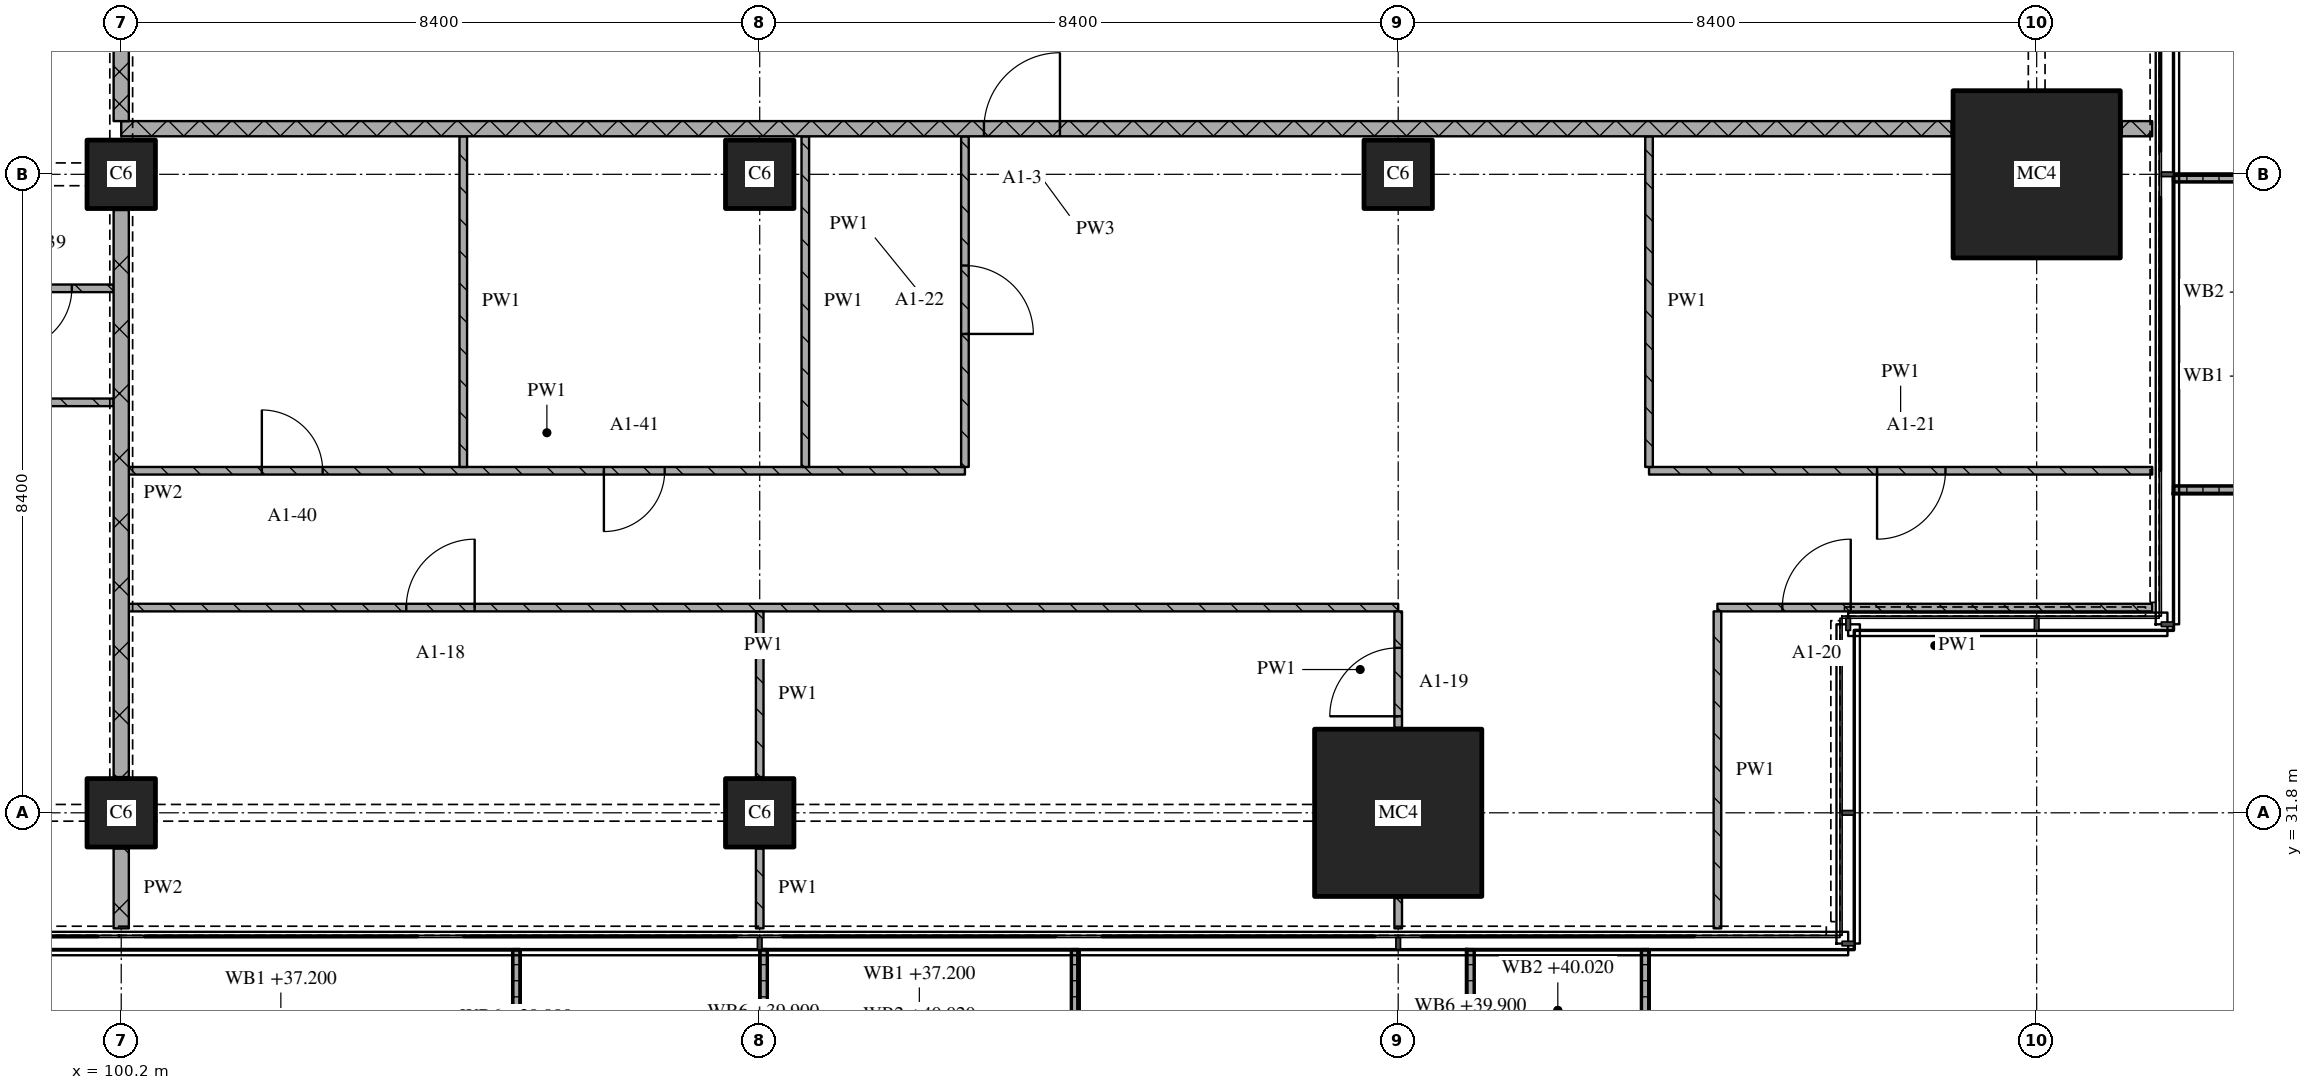
"""IFC4 building model, lengths in metres.
Left out: names, types, materials, properties, quantities, classifications, styles, units other than length and angle.
Written with IfcOpenShell. Run it as: python <this file> out.ifc"""

import sys

from ifc_helpers import new_model, si_unit, direction, frame, frame_2d, origin, origin_2d, place, context, subcontext, project, spatial, polyline, rectangle, outline, extrude, element, fill, save


model = new_model("IFC4")
c1 = context("Model", 3, precision=1e-05, world=origin(), true_north=direction((0.0, 1.0)))
c2 = subcontext(c1, "Body", "Model", "MODEL_VIEW")
j1 = project(units=[si_unit("LENGTHUNIT", "METRE"), si_unit("PLANEANGLEUNIT", "RADIAN")], contexts=[c1])
p1 = place(None, origin())
s1 = spatial("IfcSite", under=j1, at=p1, CompositionType="ELEMENT")
p2 = place(p1, origin())
s2 = spatial("IfcBuilding", under=s1, at=p2, CompositionType="ELEMENT")
p3 = place(p2, frame((0.0, 0.0, 37.2)))
s3 = spatial("IfcBuildingStorey", under=s2, at=p3, CompositionType="ELEMENT", Elevation=37.2)
for number, where, z_axis, x_axis in (
    (1, (100.2, 31.8, 0.0), (0.0, 0.0, 1.0), (1.0, 0.0, 0.0)),
    (2, (100.2, 40.2, 0.0), (0.0, 0.0, 1.0), (1.0, 0.0, 0.0)),
    (3, (108.6, 31.8, 0.0), (0.0, 0.0, 1.0), (1.0, 0.0, 0.0)),
    (4, (108.6, 40.2, 0.0), (0.0, 0.0, 1.0), (1.0, 0.0, 0.0)),
):
    element("IfcColumn", number, at=place(p3, frame(where, z_axis=z_axis, x_axis=x_axis)), inside=s3, PredefinedType="COLUMN", context=c2, shape_type="SweptSolid", body=[
        extrude(rectangle(XDim=0.9, YDim=0.9, at=origin_2d()), origin(), (0.0, 0.0, 1.0), 3.6),
    ])
p4 = place(p3, frame((117.0, 31.8, 0.0), z_axis=(0.0, 0.0, 1.0), x_axis=(1.0, 0.0, 0.0)))
e5 = element("IfcColumn", 5, at=p4, inside=s3, PredefinedType="COLUMN", context=c2, shape_type="SweptSolid", body=[
    extrude(rectangle(XDim=2.2, YDim=2.2, at=origin_2d()), origin(), (0.0, 0.0, 1.0), 3.6),
])
p5 = place(p3, frame((117.0, 40.2, 0.0), z_axis=(0.0, 0.0, 1.0), x_axis=(1.0, 0.0, 0.0)))
e6 = element("IfcColumn", 6, at=p5, inside=s3, PredefinedType="COLUMN", context=c2, shape_type="SweptSolid", body=[
    extrude(rectangle(XDim=0.9, YDim=0.9, at=origin_2d()), origin(), (0.0, 0.0, 1.0), 3.6),
])
p6 = place(p3, frame((125.4, 40.2, 0.0), z_axis=(0.0, 0.0, 1.0), x_axis=(1.0, 0.0, 0.0)))
e7 = element("IfcColumn", 7, at=p6, inside=s3, PredefinedType="COLUMN", context=c2, shape_type="SweptSolid", body=[
    extrude(rectangle(XDim=2.2, YDim=2.2, at=origin_2d()), origin(), (0.0, 0.0, 1.0), 3.6),
])
p7 = place(p3, origin())
e8 = element("IfcWall", 8, at=p7, inside=s3, PredefinedType="SOLIDWALL", context=c2, shape_type="SweptSolid", body=[
    extrude(outline(polyline([(99.15, 30.0), (99.25, 30.0), (99.25, 28.233), (105.35, 28.233), (105.35, 30.0), (105.45, 30.0), (105.45, 28.133), (99.15, 28.133), (99.15, 30.0)])), origin(), (0.0, 0.0, 1.0), 1.0),
])
p8 = place(p3, origin())
e9 = element("IfcWall", 9, at=p8, inside=s3, PredefinedType="SOLIDWALL", context=c2, shape_type="SweptSolid", body=[
    extrude(outline(polyline([(108.6, 30.0), (108.7, 30.0), (108.7, 28.367), (112.7, 28.367), (112.7, 30.0), (112.8, 30.0), (112.8, 28.267), (108.6, 28.267), (108.6, 30.0)])), origin(), (0.0, 0.0, 1.0), 1.0),
])
p9 = place(p3, origin())
e10 = element("IfcWall", 10, at=p9, inside=s3, PredefinedType="SOLIDWALL", context=c2, shape_type="SweptSolid", body=[
    extrude(outline(polyline([(117.9, 30.0), (118.0, 30.0), (118.0, 28.5), (120.2, 28.5), (120.2, 30.0), (120.3, 30.0), (120.3, 28.4), (117.9, 28.4), (117.9, 30.0)])), origin(), (0.0, 0.0, 1.0), 1.0),
])
p10 = place(p3, origin())
e11 = element("IfcWall", 11, at=p10, inside=s3, PredefinedType="SOLIDWALL", context=c2, shape_type="SweptSolid", body=[
    extrude(outline(polyline([(127.2, 36.0), (127.2, 36.1), (128.833, 36.1), (128.833, 40.1), (127.2, 40.1), (127.2, 40.2), (128.933, 40.2), (128.933, 36.0), (127.2, 36.0)])), origin(), (0.0, 0.0, 1.0), 1.0),
])
p11 = place(p3, frame((117.0, 34.5, 0.0), z_axis=(0.0, 0.0, 1.0), x_axis=(-1.0, 0.0, 0.0)))
e12 = element("IfcWall", 12, at=p11, inside=s3, PredefinedType="PARTITIONING", context=c2, shape_type="SweptSolid", body=[
    extrude(rectangle(XDim=16.7, YDim=0.1, at=frame_2d((8.35, 0.0))), origin(), (0.0, 0.0, 1.0), 3.32),
])
p12 = place(p11, frame((12.15, 0.0, 0.0)))
e13 = element("IfcOpeningElement", 13, at=p12, cuts=e12, PredefinedType="OPENING", context=c2, shape_type="SweptSolid", body=[
    extrude(rectangle(XDim=0.9, YDim=2.1, at=frame_2d((0.45, 1.05))), frame((0.0, 0.06, 0.0), z_axis=(0.0, -1.0, 0.0), x_axis=(1.0, 0.0, 0.0)), (0.0, 0.0, 1.0), 0.12),
])
p13 = place(p3, frame((126.92, 34.5, 0.0), z_axis=(0.0, 0.0, 1.0), x_axis=(-1.0, 0.0, 0.0)))
e14 = element("IfcWall", 14, at=p13, inside=s3, PredefinedType="PARTITIONING", context=c2, shape_type="SweptSolid", body=[
    extrude(rectangle(XDim=5.72, YDim=0.1, at=frame_2d((2.86, 0.0))), origin(), (0.0, 0.0, 1.0), 3.32),
])
p14 = place(p13, frame((3.966, 0.0, 0.0)))
e15 = element("IfcOpeningElement", 15, at=p14, cuts=e14, PredefinedType="OPENING", context=c2, shape_type="SweptSolid", body=[
    extrude(rectangle(XDim=0.9, YDim=2.1, at=frame_2d((0.45, 1.05))), frame((0.0, 0.06, 0.0), z_axis=(0.0, -1.0, 0.0), x_axis=(1.0, 0.0, 0.0)), (0.0, 0.0, 1.0), 0.12),
])
p15 = place(p3, frame((100.3, 36.3, 0.0), z_axis=(0.0, 0.0, 1.0), x_axis=(1.0, 0.0, 0.0)))
e16 = element("IfcWall", 16, at=p15, inside=s3, PredefinedType="PARTITIONING", context=c2, shape_type="SweptSolid", body=[
    extrude(rectangle(XDim=11.0, YDim=0.1, at=frame_2d((5.5, 0.0))), origin(), (0.0, 0.0, 1.0), 3.32),
])
p16 = place(p15, frame((1.75, 0.0, 0.0)))
e17 = element("IfcOpeningElement", 17, at=p16, cuts=e16, PredefinedType="OPENING", context=c2, shape_type="SweptSolid", body=[
    extrude(rectangle(XDim=0.8, YDim=2.1, at=frame_2d((0.4, 1.05))), frame((0.0, 0.06, 0.0), z_axis=(0.0, -1.0, 0.0), x_axis=(1.0, 0.0, 0.0)), (0.0, 0.0, 1.0), 0.12),
])
p17 = place(p15, frame((6.25, 0.0, 0.0)))
e18 = element("IfcOpeningElement", 18, at=p17, cuts=e16, PredefinedType="OPENING", context=c2, shape_type="SweptSolid", body=[
    extrude(rectangle(XDim=0.8, YDim=2.1, at=frame_2d((0.4, 1.05))), frame((0.0, 0.06, 0.0), z_axis=(0.0, -1.0, 0.0), x_axis=(1.0, 0.0, 0.0)), (0.0, 0.0, 1.0), 0.12),
])
p18 = place(p3, frame((120.3, 36.3, 0.0), z_axis=(0.0, 0.0, 1.0), x_axis=(1.0, 0.0, 0.0)))
e19 = element("IfcWall", 19, at=p18, inside=s3, PredefinedType="PARTITIONING", context=c2, shape_type="SweptSolid", body=[
    extrude(rectangle(XDim=6.62, YDim=0.1, at=frame_2d((3.31, 0.0))), origin(), (0.0, 0.0, 1.0), 3.32),
])
p19 = place(p18, frame((3.0, 0.0, 0.0)))
e20 = element("IfcOpeningElement", 20, at=p19, cuts=e19, PredefinedType="OPENING", context=c2, shape_type="SweptSolid", body=[
    extrude(rectangle(XDim=0.9, YDim=2.1, at=frame_2d((0.45, 1.05))), frame((0.0, 0.06, 0.0), z_axis=(0.0, -1.0, 0.0), x_axis=(1.0, 0.0, 0.0)), (0.0, 0.0, 1.0), 0.12),
])
p20 = place(p3, frame((100.1, 37.2, 0.0), z_axis=(0.0, 0.0, 1.0), x_axis=(-1.0, 0.0, 0.0)))
e21 = element("IfcWall", 21, at=p20, inside=s3, PredefinedType="PARTITIONING", context=c2, shape_type="SweptSolid", body=[
    extrude(rectangle(XDim=8.3, YDim=0.1, at=frame_2d((4.15, 0.0))), origin(), (0.0, 0.0, 1.0), 3.32),
])
p21 = place(p20, frame((3.65, 0.0, 0.0)))
e22 = element("IfcOpeningElement", 22, at=p21, cuts=e21, PredefinedType="OPENING", context=c2, shape_type="SweptSolid", body=[
    extrude(rectangle(XDim=0.9, YDim=2.1, at=frame_2d((0.45, 1.05))), frame((0.0, 0.06, 0.0), z_axis=(0.0, -1.0, 0.0), x_axis=(1.0, 0.0, 0.0)), (0.0, 0.0, 1.0), 0.12),
])
p22 = place(p3, frame((93.9, 38.7, 0.0), z_axis=(0.0, 0.0, 1.0), x_axis=(1.0, 0.0, 0.0)))
e23 = element("IfcWall", 23, at=p22, inside=s3, PredefinedType="PARTITIONING", context=c2, shape_type="SweptSolid", body=[
    extrude(rectangle(XDim=6.2, YDim=0.1, at=frame_2d((3.1, 0.0))), origin(), (0.0, 0.0, 1.0), 3.32),
])
p23 = place(p22, frame((4.85, 0.0, 0.0)))
e24 = element("IfcOpeningElement", 24, at=p23, cuts=e23, PredefinedType="OPENING", context=c2, shape_type="SweptSolid", body=[
    extrude(rectangle(XDim=0.8, YDim=2.1, at=frame_2d((0.4, 1.05))), frame((0.0, 0.06, 0.0), z_axis=(0.0, -1.0, 0.0), x_axis=(1.0, 0.0, 0.0)), (0.0, 0.0, 1.0), 0.12),
])
p24 = place(p3, frame((124.28, 40.8, 0.0), z_axis=(0.0, 0.0, 1.0), x_axis=(-1.0, 0.0, 0.0)))
e25 = element("IfcWall", 25, at=p24, inside=s3, PredefinedType="PARTITIONING", context=c2, shape_type="SweptSolid", body=[
    extrude(rectangle(XDim=24.08, YDim=0.2, at=frame_2d((12.04, 0.0))), origin(), (0.0, 0.0, 1.0), 3.32),
])
p25 = place(p24, frame((11.73, 0.0, 0.0)))
e26 = element("IfcOpeningElement", 26, at=p25, cuts=e25, PredefinedType="OPENING", context=c2, shape_type="SweptSolid", body=[
    extrude(rectangle(XDim=1.0, YDim=2.1, at=frame_2d((0.5, 1.05))), frame((0.0, 0.11, 0.0), z_axis=(0.0, -1.0, 0.0), x_axis=(1.0, 0.0, 0.0)), (0.0, 0.0, 1.0), 0.22),
])
p26 = place(p3, frame((126.52, 40.8, 0.0), z_axis=(0.0, 0.0, 1.0), x_axis=(1.0, 0.0, 0.0)))
e27 = element("IfcWall", 27, at=p26, inside=s3, PredefinedType="PARTITIONING", context=c2, shape_type="SweptSolid", body=[
    extrude(rectangle(XDim=0.4, YDim=0.2, at=frame_2d((0.2, 0.0))), origin(), (0.0, 0.0, 1.0), 3.32),
])
p27 = place(p3, frame((100.2, 43.1, 0.0), z_axis=(0.0, 0.0, 1.0), x_axis=(0.0, -1.0, 0.0)))
e28 = element("IfcWall", 28, at=p27, inside=s3, PredefinedType="PARTITIONING", context=c2, shape_type="SweptSolid", body=[
    extrude(rectangle(XDim=2.2, YDim=0.2, at=frame_2d((1.1, 0.0))), origin(), (0.0, 0.0, 1.0), 2.43),
])
p28 = place(p3, frame((100.2, 31.33, 0.0), z_axis=(0.0, 0.0, 1.0), x_axis=(0.0, -1.0, 0.0)))
e29 = element("IfcWall", 29, at=p28, inside=s3, PredefinedType="PARTITIONING", context=c2, shape_type="SweptSolid", body=[
    extrude(rectangle(XDim=1.05, YDim=0.2, at=frame_2d((0.525, 0.0))), origin(), (0.0, 0.0, 1.0), 3.32),
])
p29 = place(p3, frame((100.2, 39.73, 0.0), z_axis=(0.0, 0.0, 1.0), x_axis=(0.0, -1.0, 0.0)))
e30 = element("IfcWall", 30, at=p29, inside=s3, PredefinedType="PARTITIONING", context=c2, shape_type="SweptSolid", body=[
    extrude(rectangle(XDim=7.46, YDim=0.2, at=frame_2d((3.73, 0.0))), origin(), (0.0, 0.0, 1.0), 2.83),
])
p30 = place(p3, frame((104.7, 40.7, 0.0), z_axis=(0.0, 0.0, 1.0), x_axis=(0.0, -1.0, 0.0)))
e31 = element("IfcWall", 31, at=p30, inside=s3, PredefinedType="PARTITIONING", context=c2, shape_type="SweptSolid", body=[
    extrude(rectangle(XDim=4.35, YDim=0.1, at=frame_2d((2.175, 0.0))), origin(), (0.0, 0.0, 1.0), 3.32),
])
p31 = place(p3, frame((108.6, 31.33, 0.0), z_axis=(0.0, 0.0, 1.0), x_axis=(0.0, -1.0, 0.0)))
e32 = element("IfcWall", 32, at=p31, inside=s3, PredefinedType="PARTITIONING", context=c2, shape_type="SweptSolid", body=[
    extrude(rectangle(XDim=1.05, YDim=0.1, at=frame_2d((0.525, 0.0))), origin(), (0.0, 0.0, 1.0), 3.32),
])
p32 = place(p3, frame((108.6, 34.45, 0.0), z_axis=(0.0, 0.0, 1.0), x_axis=(0.0, -1.0, 0.0)))
e33 = element("IfcWall", 33, at=p32, inside=s3, PredefinedType="PARTITIONING", context=c2, shape_type="SweptSolid", body=[
    extrude(rectangle(XDim=2.18, YDim=0.1, at=frame_2d((1.09, 0.0))), origin(), (0.0, 0.0, 1.0), 3.32),
])
p33 = place(p3, frame((109.2, 40.7, 0.0), z_axis=(0.0, 0.0, 1.0), x_axis=(0.0, -1.0, 0.0)))
e34 = element("IfcWall", 34, at=p33, inside=s3, PredefinedType="PARTITIONING", context=c2, shape_type="SweptSolid", body=[
    extrude(rectangle(XDim=4.35, YDim=0.1, at=frame_2d((2.175, 0.0))), origin(), (0.0, 0.0, 1.0), 3.32),
])
p34 = place(p3, frame((111.3, 36.35, 0.0), z_axis=(0.0, 0.0, 1.0), x_axis=(0.0, 1.0, 0.0)))
e35 = element("IfcWall", 35, at=p34, inside=s3, PredefinedType="PARTITIONING", context=c2, shape_type="SweptSolid", body=[
    extrude(rectangle(XDim=4.35, YDim=0.1, at=frame_2d((2.175, 0.0))), origin(), (0.0, 0.0, 1.0), 3.32),
])
p35 = place(p34, frame((1.75, 0.0, 0.0)))
e36 = element("IfcOpeningElement", 36, at=p35, cuts=e35, PredefinedType="OPENING", context=c2, shape_type="SweptSolid", body=[
    extrude(rectangle(XDim=0.9, YDim=2.1, at=frame_2d((0.45, 1.05))), frame((0.0, 0.06, 0.0), z_axis=(0.0, -1.0, 0.0), x_axis=(1.0, 0.0, 0.0)), (0.0, 0.0, 1.0), 0.12),
])
p36 = place(p3, frame((117.0, 30.68, 0.0), z_axis=(0.0, 0.0, 1.0), x_axis=(0.0, -1.0, 0.0)))
e37 = element("IfcWall", 37, at=p36, inside=s3, PredefinedType="PARTITIONING", context=c2, shape_type="SweptSolid", body=[
    extrude(rectangle(XDim=0.4, YDim=0.1, at=frame_2d((0.2, 0.0))), origin(), (0.0, 0.0, 1.0), 3.32),
])
p37 = place(p3, frame((117.0, 32.92, 0.0), z_axis=(0.0, 0.0, 1.0), x_axis=(0.0, 1.0, 0.0)))
e38 = element("IfcWall", 38, at=p37, inside=s3, PredefinedType="PARTITIONING", context=c2, shape_type="SweptSolid", body=[
    extrude(rectangle(XDim=1.53, YDim=0.1, at=frame_2d((0.765, 0.0))), origin(), (0.0, 0.0, 1.0), 3.32),
])
p38 = place(p37, frame((0.15, 0.0, 0.0)))
e39 = element("IfcOpeningElement", 39, at=p38, cuts=e38, PredefinedType="OPENING", context=c2, shape_type="SweptSolid", body=[
    extrude(rectangle(XDim=0.9, YDim=2.1, at=frame_2d((0.45, 1.05))), frame((0.0, 0.06, 0.0), z_axis=(0.0, -1.0, 0.0), x_axis=(1.0, 0.0, 0.0)), (0.0, 0.0, 1.0), 0.12),
])
p39 = place(p3, frame((120.3, 40.7, 0.0), z_axis=(0.0, 0.0, 1.0), x_axis=(0.0, -1.0, 0.0)))
e40 = element("IfcWall", 40, at=p39, inside=s3, PredefinedType="PARTITIONING", context=c2, shape_type="SweptSolid", body=[
    extrude(rectangle(XDim=4.35, YDim=0.1, at=frame_2d((2.175, 0.0))), origin(), (0.0, 0.0, 1.0), 3.32),
])
p40 = place(p3, frame((121.2, 34.45, 0.0), z_axis=(0.0, 0.0, 1.0), x_axis=(0.0, -1.0, 0.0)))
e41 = element("IfcWall", 41, at=p40, inside=s3, PredefinedType="PARTITIONING", context=c2, shape_type="SweptSolid", body=[
    extrude(rectangle(XDim=4.17, YDim=0.1, at=frame_2d((2.085, 0.0))), origin(), (0.0, 0.0, 1.0), 3.32),
])
p41 = place(p12, origin())
e42 = element("IfcDoor", 42, at=p41, inside=s3, OperationType="SINGLE_SWING_RIGHT", PredefinedType="DOOR", context=c2, shape_type="SweptSolid", body=[
    extrude(rectangle(XDim=0.9, YDim=2.1, at=frame_2d((0.45, 1.05))), frame((0.0, 0.025, 0.0), z_axis=(0.0, -1.0, 0.0), x_axis=(1.0, 0.0, 0.0)), (0.0, 0.0, 1.0), 0.05),
])
fill(e13, e42)
p42 = place(p14, origin())
e43 = element("IfcDoor", 43, at=p42, inside=s3, OperationType="SINGLE_SWING_RIGHT", PredefinedType="DOOR", context=c2, shape_type="SweptSolid", body=[
    extrude(rectangle(XDim=0.9, YDim=2.1, at=frame_2d((0.45, 1.05))), frame((0.0, 0.025, 0.0), z_axis=(0.0, -1.0, 0.0), x_axis=(1.0, 0.0, 0.0)), (0.0, 0.0, 1.0), 0.05),
])
fill(e15, e43)
p43 = place(p16, origin())
e44 = element("IfcDoor", 44, at=p43, inside=s3, OperationType="SINGLE_SWING_LEFT", PredefinedType="DOOR", context=c2, shape_type="SweptSolid", body=[
    extrude(rectangle(XDim=0.8, YDim=2.1, at=frame_2d((0.4, 1.05))), frame((0.0, 0.025, 0.0), z_axis=(0.0, -1.0, 0.0), x_axis=(1.0, 0.0, 0.0)), (0.0, 0.0, 1.0), 0.05),
])
fill(e17, e44)
p44 = place(p17, origin())
e45 = element("IfcDoor", 45, at=p44, inside=s3, OperationType="SINGLE_SWING_RIGHT", PredefinedType="DOOR", context=c2, shape_type="SweptSolid", body=[
    extrude(rectangle(XDim=0.8, YDim=2.1, at=frame_2d((0.4, 1.05))), frame((0.0, 0.025, 0.0), z_axis=(0.0, -1.0, 0.0), x_axis=(1.0, 0.0, 0.0)), (0.0, 0.0, 1.0), 0.05),
])
fill(e18, e45)
p45 = place(p19, origin())
e46 = element("IfcDoor", 46, at=p45, inside=s3, OperationType="SINGLE_SWING_RIGHT", PredefinedType="DOOR", context=c2, shape_type="SweptSolid", body=[
    extrude(rectangle(XDim=0.9, YDim=2.1, at=frame_2d((0.45, 1.05))), frame((0.0, 0.025, 0.0), z_axis=(0.0, -1.0, 0.0), x_axis=(1.0, 0.0, 0.0)), (0.0, 0.0, 1.0), 0.05),
])
fill(e20, e46)
p46 = place(p23, origin())
e47 = element("IfcDoor", 47, at=p46, inside=s3, OperationType="SINGLE_SWING_RIGHT", PredefinedType="DOOR", context=c2, shape_type="SweptSolid", body=[
    extrude(rectangle(XDim=0.8, YDim=2.1, at=frame_2d((0.4, 1.05))), frame((0.0, 0.025, 0.0), z_axis=(0.0, -1.0, 0.0), x_axis=(1.0, 0.0, 0.0)), (0.0, 0.0, 1.0), 0.05),
])
fill(e24, e47)
p47 = place(p25, origin())
e48 = element("IfcDoor", 48, at=p47, inside=s3, OperationType="SINGLE_SWING_RIGHT", PredefinedType="DOOR", context=c2, shape_type="SweptSolid", body=[
    extrude(rectangle(XDim=1.0, YDim=2.1, at=frame_2d((0.5, 1.05))), frame((0.0, 0.025, 0.0), z_axis=(0.0, -1.0, 0.0), x_axis=(1.0, 0.0, 0.0)), (0.0, 0.0, 1.0), 0.05),
])
fill(e26, e48)
p48 = place(p35, origin())
e49 = element("IfcDoor", 49, at=p48, inside=s3, OperationType="SINGLE_SWING_RIGHT", PredefinedType="DOOR", context=c2, shape_type="SweptSolid", body=[
    extrude(rectangle(XDim=0.9, YDim=2.1, at=frame_2d((0.45, 1.05))), frame((0.0, 0.025, 0.0), z_axis=(0.0, -1.0, 0.0), x_axis=(1.0, 0.0, 0.0)), (0.0, 0.0, 1.0), 0.05),
])
fill(e36, e49)
p49 = place(p38, origin())
e50 = element("IfcDoor", 50, at=p49, inside=s3, OperationType="SINGLE_SWING_LEFT", PredefinedType="DOOR", context=c2, shape_type="SweptSolid", body=[
    extrude(rectangle(XDim=0.9, YDim=2.1, at=frame_2d((0.45, 1.05))), frame((0.0, 0.025, 0.0), z_axis=(0.0, -1.0, 0.0), x_axis=(1.0, 0.0, 0.0)), (0.0, 0.0, 1.0), 0.05),
])
fill(e39, e50)
save(model, sys.argv[1])
